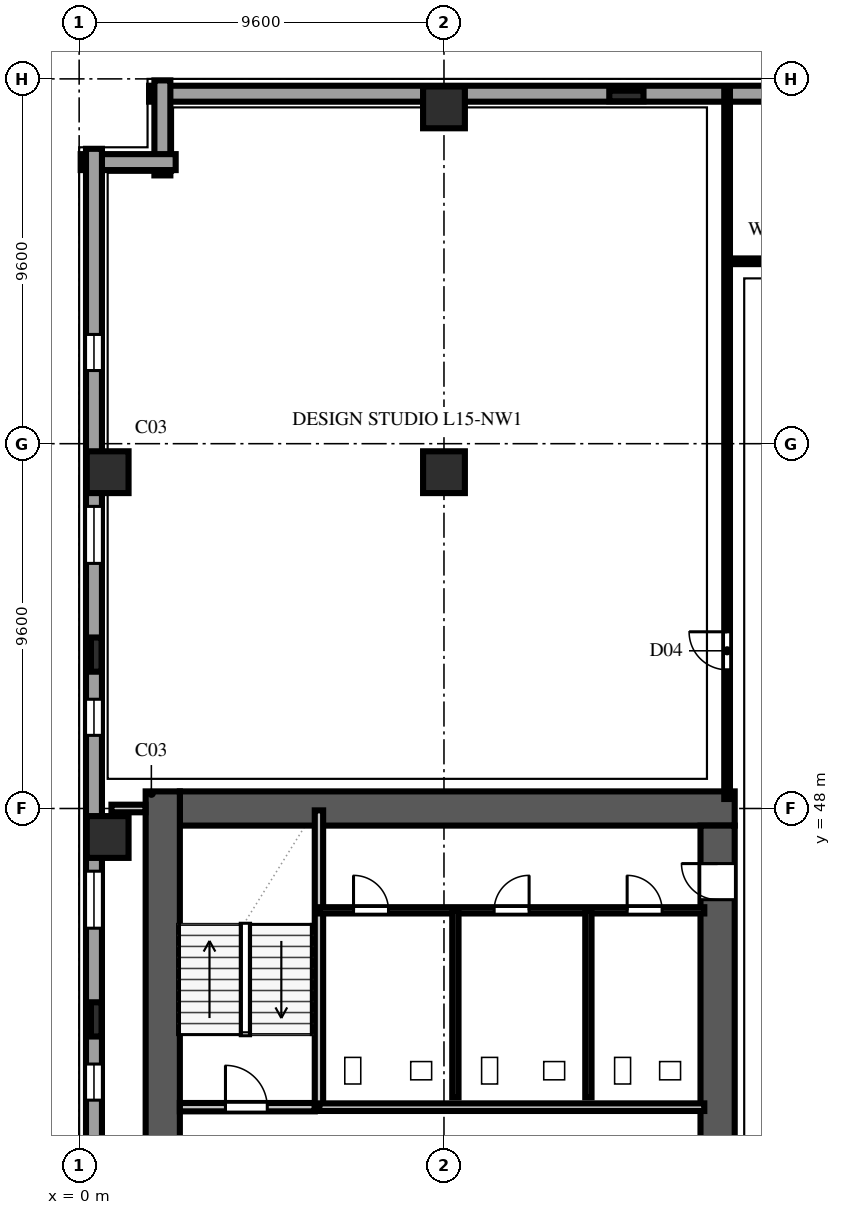
"""IFC4 building model, lengths in metres.
Left out: names, types, materials, properties, quantities, classifications, styles, units other than length and angle.
Written with IfcOpenShell. Run it as: python <this file> out.ifc"""

import sys

from ifc_helpers import new_model, si_unit, direction, frame, frame_2d, origin, origin_2d, place, context, subcontext, project, spatial, rectangle, extrude, element, fill, save


model = new_model("IFC4")
c1 = context("Model", 3, precision=1e-05, world=origin(), true_north=direction((0.0, 1.0)))
c2 = subcontext(c1, "Body", "Model", "MODEL_VIEW")
j1 = project(units=[si_unit("LENGTHUNIT", "METRE"), si_unit("PLANEANGLEUNIT", "RADIAN")], contexts=[c1])
p1 = place(None, origin())
s1 = spatial("IfcSite", under=j1, at=p1, CompositionType="ELEMENT")
p2 = place(p1, origin())
s2 = spatial("IfcBuilding", under=s1, at=p2, CompositionType="ELEMENT")
p3 = place(p2, frame((0.0, 0.0, 62.2)))
s3 = spatial("IfcBuildingStorey", under=s2, at=p3, CompositionType="ELEMENT", Elevation=62.2)
p4 = place(p3, frame((2.65, 48.0, 0.0), z_axis=(0.0, 0.0, 1.0), x_axis=(1.0, 0.0, 0.0)))
e1 = element("IfcWall", 1, at=p4, inside=s3, PredefinedType="SHEAR", context=c2, shape_type="SweptSolid", body=[
    extrude(rectangle(XDim=14.6, YDim=0.9, at=frame_2d((7.3, 0.0))), origin(), (0.0, 0.0, 1.0), 3.54),
])
p5 = place(p3, frame((2.2, 9.15, 0.0), z_axis=(0.0, 0.0, 1.0), x_axis=(0.0, 1.0, 0.0)))
e2 = element("IfcWall", 2, at=p5, inside=s3, PredefinedType="SHEAR", context=c2, shape_type="SweptSolid", body=[
    extrude(rectangle(XDim=39.3, YDim=0.9, at=frame_2d((19.65, 0.0))), origin(), (0.0, 0.0, 1.0), 3.54),
])
p6 = place(p3, frame((16.8, 36.4, 0.0), z_axis=(0.0, 0.0, 1.0), x_axis=(0.0, 1.0, 0.0)))
e3 = element("IfcWall", 3, at=p6, inside=s3, PredefinedType="SHEAR", context=c2, shape_type="SweptSolid", body=[
    extrude(rectangle(XDim=11.15, YDim=0.9, at=frame_2d((5.575, 0.0))), origin(), (0.0, 0.0, 1.0), 3.54),
])
p7 = place(p6, frame((9.2, 0.0, 0.0)))
e4 = element("IfcOpeningElement", 4, at=p7, cuts=e3, PredefinedType="OPENING", context=c2, shape_type="SweptSolid", body=[
    extrude(rectangle(XDim=0.95, YDim=2.15, at=frame_2d((0.475, 1.075))), frame((0.0, 0.462, 0.0), z_axis=(0.0, -1.0, 0.0), x_axis=(1.0, 0.0, 0.0)), (0.0, 0.0, 1.0), 0.924),
])
for number, where, z_axis, x_axis in (
    (5, (0.75, 47.25, 0.0), (0.0, 0.0, 1.0), (1.0, 0.0, 0.0)),
    (6, (0.75, 56.85, 0.0), (0.0, 0.0, 1.0), (1.0, 0.0, 0.0)),
    (7, (9.6, 56.85, 0.0), (0.0, 0.0, 1.0), (1.0, 0.0, 0.0)),
    (8, (9.6, 66.45, 0.0), (0.0, 0.0, 1.0), (1.0, 0.0, 0.0)),
):
    element("IfcColumn", number, at=place(p3, frame(where, z_axis=z_axis, x_axis=x_axis)), inside=s3, PredefinedType="COLUMN", context=c2, shape_type="SweptSolid", body=[
        extrude(rectangle(XDim=1.1, YDim=1.1, at=origin_2d()), origin(), (0.0, 0.0, 1.0), 3.8),
    ])
for number, where, z_axis, x_axis in (
    (9, (0.45, 42.45, 0.0), (0.0, 0.0, 1.0), (0.0, 1.0, 0.0)),
    (10, (0.45, 52.05, 0.0), (0.0, 0.0, 1.0), (0.0, 1.0, 0.0)),
    (11, (14.4, 66.75, 0.0), (0.0, 0.0, 1.0), (1.0, 0.0, 0.0)),
):
    element("IfcColumn", number, at=place(p3, frame(where, z_axis=z_axis, x_axis=x_axis)), inside=s3, PredefinedType="PILASTER", context=c2, shape_type="SweptSolid", body=[
        extrude(rectangle(XDim=0.9, YDim=0.28, at=origin_2d()), origin(), (0.0, 0.0, 1.0), 3.8),
    ])
p8 = place(p3, frame((36.56, 66.81, 0.0), z_axis=(0.0, 0.0, 1.0), x_axis=(-1.0, 0.0, 0.0)))
e12 = element("IfcWall", 12, at=p8, inside=s3, PredefinedType="SOLIDWALL", context=c2, shape_type="SweptSolid", body=[
    extrude(rectangle(XDim=34.72, YDim=0.42, at=frame_2d((17.36, 0.0))), origin(), (0.0, 0.0, 1.0), 3.54),
])
p9 = place(p8, frame((4.885, 0.0, 0.9)))
e13 = element("IfcOpeningElement", 13, at=p9, cuts=e12, PredefinedType="OPENING", context=c2, shape_type="SweptSolid", body=[
    extrude(rectangle(XDim=0.95, YDim=1.85, at=frame_2d((0.475, 0.925))), frame((0.0, 0.222, 0.0), z_axis=(0.0, -1.0, 0.0), x_axis=(1.0, 0.0, 0.0)), (0.0, 0.0, 1.0), 0.444),
])
p10 = place(p8, frame((9.41, 0.0, 0.9)))
e14 = element("IfcOpeningElement", 14, at=p10, cuts=e12, PredefinedType="OPENING", context=c2, shape_type="SweptSolid", body=[
    extrude(rectangle(XDim=1.5, YDim=1.85, at=frame_2d((0.75, 0.925))), frame((0.0, 0.222, 0.0), z_axis=(0.0, -1.0, 0.0), x_axis=(1.0, 0.0, 0.0)), (0.0, 0.0, 1.0), 0.444),
])
p11 = place(p8, frame((14.485, 0.0, 0.9)))
e15 = element("IfcOpeningElement", 15, at=p11, cuts=e12, PredefinedType="OPENING", context=c2, shape_type="SweptSolid", body=[
    extrude(rectangle(XDim=0.95, YDim=1.85, at=frame_2d((0.475, 0.925))), frame((0.0, 0.222, 0.0), z_axis=(0.0, -1.0, 0.0), x_axis=(1.0, 0.0, 0.0)), (0.0, 0.0, 1.0), 0.444),
])
for number, where, z_axis, x_axis in (
    (16, (2.19, 67.16, 0.0), (0.0, 0.0, 1.0), (0.0, -1.0, 0.0)),
    (17, (2.54, 65.01, 0.0), (0.0, 0.0, 1.0), (-1.0, 0.0, 0.0)),
):
    element("IfcWall", number, at=place(p3, frame(where, z_axis=z_axis, x_axis=x_axis)), inside=s3, PredefinedType="SOLIDWALL", context=c2, shape_type="SweptSolid", body=[
        extrude(rectangle(XDim=2.5, YDim=0.42, at=frame_2d((1.25, 0.0))), origin(), (0.0, 0.0, 1.0), 3.54),
    ])
p12 = place(p3, frame((0.39, 65.36, 0.0), z_axis=(0.0, 0.0, 1.0), x_axis=(0.0, -1.0, 0.0)))
e18 = element("IfcWall", 18, at=p12, inside=s3, PredefinedType="SOLIDWALL", context=c2, shape_type="SweptSolid", body=[
    extrude(rectangle(XDim=63.52, YDim=0.42, at=frame_2d((31.76, 0.0))), origin(), (0.0, 0.0, 1.0), 3.54),
])
p13 = place(p12, frame((4.885, 0.0, 0.9)))
e19 = element("IfcOpeningElement", 19, at=p13, cuts=e18, PredefinedType="OPENING", context=c2, shape_type="SweptSolid", body=[
    extrude(rectangle(XDim=0.95, YDim=1.85, at=frame_2d((0.475, 0.925))), frame((0.0, 0.222, 0.0), z_axis=(0.0, -1.0, 0.0), x_axis=(1.0, 0.0, 0.0)), (0.0, 0.0, 1.0), 0.444),
])
p14 = place(p12, frame((9.41, 0.0, 0.9)))
e20 = element("IfcOpeningElement", 20, at=p14, cuts=e18, PredefinedType="OPENING", context=c2, shape_type="SweptSolid", body=[
    extrude(rectangle(XDim=1.5, YDim=1.85, at=frame_2d((0.75, 0.925))), frame((0.0, 0.222, 0.0), z_axis=(0.0, -1.0, 0.0), x_axis=(1.0, 0.0, 0.0)), (0.0, 0.0, 1.0), 0.444),
])
p15 = place(p12, frame((14.485, 0.0, 0.9)))
e21 = element("IfcOpeningElement", 21, at=p15, cuts=e18, PredefinedType="OPENING", context=c2, shape_type="SweptSolid", body=[
    extrude(rectangle(XDim=0.95, YDim=1.85, at=frame_2d((0.475, 0.925))), frame((0.0, 0.222, 0.0), z_axis=(0.0, -1.0, 0.0), x_axis=(1.0, 0.0, 0.0)), (0.0, 0.0, 1.0), 0.444),
])
p16 = place(p12, frame((19.01, 0.0, 0.9)))
e22 = element("IfcOpeningElement", 22, at=p16, cuts=e18, PredefinedType="OPENING", context=c2, shape_type="SweptSolid", body=[
    extrude(rectangle(XDim=1.5, YDim=1.85, at=frame_2d((0.75, 0.925))), frame((0.0, 0.222, 0.0), z_axis=(0.0, -1.0, 0.0), x_axis=(1.0, 0.0, 0.0)), (0.0, 0.0, 1.0), 0.444),
])
p17 = place(p12, frame((24.085, 0.0, 0.9)))
e23 = element("IfcOpeningElement", 23, at=p17, cuts=e18, PredefinedType="OPENING", context=c2, shape_type="SweptSolid", body=[
    extrude(rectangle(XDim=0.95, YDim=1.85, at=frame_2d((0.475, 0.925))), frame((0.0, 0.222, 0.0), z_axis=(0.0, -1.0, 0.0), x_axis=(1.0, 0.0, 0.0)), (0.0, 0.0, 1.0), 0.444),
])
p18 = place(p12, frame((28.61, 0.0, 0.9)))
e24 = element("IfcOpeningElement", 24, at=p18, cuts=e18, PredefinedType="OPENING", context=c2, shape_type="SweptSolid", body=[
    extrude(rectangle(XDim=1.5, YDim=1.85, at=frame_2d((0.75, 0.925))), frame((0.0, 0.222, 0.0), z_axis=(0.0, -1.0, 0.0), x_axis=(1.0, 0.0, 0.0)), (0.0, 0.0, 1.0), 0.444),
])
p19 = place(p12, frame((33.685, 0.0, 0.9)))
e25 = element("IfcOpeningElement", 25, at=p19, cuts=e18, PredefinedType="OPENING", context=c2, shape_type="SweptSolid", body=[
    extrude(rectangle(XDim=0.95, YDim=1.85, at=frame_2d((0.475, 0.925))), frame((0.0, 0.222, 0.0), z_axis=(0.0, -1.0, 0.0), x_axis=(1.0, 0.0, 0.0)), (0.0, 0.0, 1.0), 0.444),
])
p20 = place(p12, frame((38.21, 0.0, 0.9)))
e26 = element("IfcOpeningElement", 26, at=p20, cuts=e18, PredefinedType="OPENING", context=c2, shape_type="SweptSolid", body=[
    extrude(rectangle(XDim=1.5, YDim=1.85, at=frame_2d((0.75, 0.925))), frame((0.0, 0.222, 0.0), z_axis=(0.0, -1.0, 0.0), x_axis=(1.0, 0.0, 0.0)), (0.0, 0.0, 1.0), 0.444),
])
p21 = place(p12, frame((43.285, 0.0, 0.9)))
e27 = element("IfcOpeningElement", 27, at=p21, cuts=e18, PredefinedType="OPENING", context=c2, shape_type="SweptSolid", body=[
    extrude(rectangle(XDim=0.95, YDim=1.85, at=frame_2d((0.475, 0.925))), frame((0.0, 0.222, 0.0), z_axis=(0.0, -1.0, 0.0), x_axis=(1.0, 0.0, 0.0)), (0.0, 0.0, 1.0), 0.444),
])
p22 = place(p12, frame((47.81, 0.0, 0.9)))
e28 = element("IfcOpeningElement", 28, at=p22, cuts=e18, PredefinedType="OPENING", context=c2, shape_type="SweptSolid", body=[
    extrude(rectangle(XDim=1.5, YDim=1.85, at=frame_2d((0.75, 0.925))), frame((0.0, 0.222, 0.0), z_axis=(0.0, -1.0, 0.0), x_axis=(1.0, 0.0, 0.0)), (0.0, 0.0, 1.0), 0.444),
])
p23 = place(p12, frame((52.885, 0.0, 0.9)))
e29 = element("IfcOpeningElement", 29, at=p23, cuts=e18, PredefinedType="OPENING", context=c2, shape_type="SweptSolid", body=[
    extrude(rectangle(XDim=0.95, YDim=1.85, at=frame_2d((0.475, 0.925))), frame((0.0, 0.222, 0.0), z_axis=(0.0, -1.0, 0.0), x_axis=(1.0, 0.0, 0.0)), (0.0, 0.0, 1.0), 0.444),
])
p24 = place(p3, frame((2.65, 40.14, 0.0), z_axis=(0.0, 0.0, 1.0), x_axis=(1.0, 0.0, 0.0)))
e30 = element("IfcWall", 30, at=p24, inside=s3, PredefinedType="SOLIDWALL", context=c2, shape_type="SweptSolid", body=[
    extrude(rectangle(XDim=3.55, YDim=0.22, at=frame_2d((1.775, 0.0))), origin(), (0.0, 0.0, 1.0), 3.54),
])
p25 = place(p24, frame((1.2, 0.0, 0.0)))
e31 = element("IfcOpeningElement", 31, at=p25, cuts=e30, PredefinedType="OPENING", context=c2, shape_type="SweptSolid", body=[
    extrude(rectangle(XDim=1.1, YDim=2.2, at=frame_2d((0.55, 1.1))), frame((0.0, 0.122, 0.0), z_axis=(0.0, -1.0, 0.0), x_axis=(1.0, 0.0, 0.0)), (0.0, 0.0, 1.0), 0.244),
])
p26 = place(p3, frame((6.31, 40.14, 0.0), z_axis=(0.0, 0.0, 1.0), x_axis=(0.0, 1.0, 0.0)))
e32 = element("IfcWall", 32, at=p26, inside=s3, PredefinedType="SOLIDWALL", context=c2, shape_type="SweptSolid", body=[
    extrude(rectangle(XDim=7.81, YDim=0.22, at=frame_2d((3.905, 0.0))), origin(), (0.0, 0.0, 1.0), 3.54),
])
p27 = place(p3, frame((6.32, 40.14, 0.0), z_axis=(0.0, 0.0, 1.0), x_axis=(1.0, 0.0, 0.0)))
e33 = element("IfcWall", 33, at=p27, inside=s3, PredefinedType="SOLIDWALL", context=c2, shape_type="SweptSolid", body=[
    extrude(rectangle(XDim=10.13, YDim=0.2, at=frame_2d((5.065, 0.0))), origin(), (0.0, 0.0, 1.0), 3.54),
])
p28 = place(p3, frame((6.32, 45.32, 0.0), z_axis=(0.0, 0.0, 1.0), x_axis=(1.0, 0.0, 0.0)))
e34 = element("IfcWall", 34, at=p28, inside=s3, PredefinedType="PLUMBINGWALL", context=c2, shape_type="SweptSolid", body=[
    extrude(rectangle(XDim=10.13, YDim=0.165, at=frame_2d((5.065, 0.0))), origin(), (0.0, 0.0, 1.0), 3.54),
])
p29 = place(p28, frame((0.9, 0.0, 0.0)))
e35 = element("IfcOpeningElement", 35, at=p29, cuts=e34, PredefinedType="OPENING", context=c2, shape_type="SweptSolid", body=[
    extrude(rectangle(XDim=0.92, YDim=2.15, at=frame_2d((0.46, 1.075))), frame((0.0, 0.094, 0.0), z_axis=(0.0, -1.0, 0.0), x_axis=(1.0, 0.0, 0.0)), (0.0, 0.0, 1.0), 0.189),
])
p30 = place(p28, frame((4.6, 0.0, 0.0)))
e36 = element("IfcOpeningElement", 36, at=p30, cuts=e34, PredefinedType="OPENING", context=c2, shape_type="SweptSolid", body=[
    extrude(rectangle(XDim=0.92, YDim=2.15, at=frame_2d((0.46, 1.075))), frame((0.0, 0.094, 0.0), z_axis=(0.0, -1.0, 0.0), x_axis=(1.0, 0.0, 0.0)), (0.0, 0.0, 1.0), 0.189),
])
p31 = place(p28, frame((8.1, 0.0, 0.0)))
e37 = element("IfcOpeningElement", 37, at=p31, cuts=e34, PredefinedType="OPENING", context=c2, shape_type="SweptSolid", body=[
    extrude(rectangle(XDim=0.92, YDim=2.15, at=frame_2d((0.46, 1.075))), frame((0.0, 0.094, 0.0), z_axis=(0.0, -1.0, 0.0), x_axis=(1.0, 0.0, 0.0)), (0.0, 0.0, 1.0), 0.189),
])
for number, where, z_axis, x_axis in (
    (38, (9.9, 40.4, 0.0), (0.0, 0.0, 1.0), (0.0, 1.0, 0.0)),
    (39, (13.4, 40.4, 0.0), (0.0, 0.0, 1.0), (0.0, 1.0, 0.0)),
):
    element("IfcWall", number, at=place(p3, frame(where, z_axis=z_axis, x_axis=x_axis)), inside=s3, PredefinedType="PLUMBINGWALL", context=c2, shape_type="SweptSolid", body=[
        extrude(rectangle(XDim=4.92, YDim=0.165, at=frame_2d((2.46, 0.0))), origin(), (0.0, 0.0, 1.0), 3.54),
    ])
p32 = place(p3, frame((0.85, 48.0, 0.0), z_axis=(0.0, 0.0, 1.0), x_axis=(1.0, 0.0, 0.0)))
e40 = element("IfcWall", 40, at=p32, inside=s3, PredefinedType="SOLIDWALL", context=c2, shape_type="SweptSolid", body=[
    extrude(rectangle(XDim=0.895, YDim=0.2, at=frame_2d((0.448, 0.0))), origin(), (0.0, 0.0, 1.0), 3.54),
])
p33 = place(p3, frame((17.05, 62.4, 0.0), z_axis=(0.0, 0.0, 1.0), x_axis=(1.0, 0.0, 0.0)))
e41 = element("IfcWall", 41, at=p33, inside=s3, PredefinedType="PARTITIONING", context=c2, shape_type="SweptSolid", body=[
    extrude(rectangle(XDim=2.15, YDim=0.15, at=frame_2d((1.075, 0.0))), origin(), (0.0, 0.0, 1.0), 3.54),
])
p34 = place(p3, frame((17.05, 48.25, 0.0), z_axis=(0.0, 0.0, 1.0), x_axis=(0.0, 1.0, 0.0)))
e42 = element("IfcWall", 42, at=p34, inside=s3, PredefinedType="PARTITIONING", context=c2, shape_type="SweptSolid", body=[
    extrude(rectangle(XDim=18.73, YDim=0.15, at=frame_2d((9.365, 0.0))), origin(), (0.0, 0.0, 1.0), 3.54),
])
p35 = place(p34, frame((3.4, 0.0, 0.0)))
e43 = element("IfcOpeningElement", 43, at=p35, cuts=e42, PredefinedType="OPENING", context=c2, shape_type="SweptSolid", body=[
    extrude(rectangle(XDim=1.0, YDim=2.2, at=frame_2d((0.5, 1.1))), frame((0.0, 0.087, 0.0), z_axis=(0.0, -1.0, 0.0), x_axis=(1.0, 0.0, 0.0)), (0.0, 0.0, 1.0), 0.174),
])
p36 = place(p13, origin())
e44 = element("IfcWindow", 44, at=p36, inside=s3, PartitioningType="SINGLE_PANEL", PredefinedType="WINDOW", context=c2, shape_type="SweptSolid", body=[
    extrude(rectangle(XDim=0.95, YDim=1.85, at=frame_2d((0.475, 0.925))), frame((0.0, 0.11, 0.0), z_axis=(0.0, -1.0, 0.0), x_axis=(1.0, 0.0, 0.0)), (0.0, 0.0, 1.0), 0.06),
])
fill(e19, e44)
p37 = place(p14, origin())
e45 = element("IfcWindow", 45, at=p37, inside=s3, PartitioningType="DOUBLE_PANEL_VERTICAL", PredefinedType="WINDOW", context=c2, shape_type="SweptSolid", body=[
    extrude(rectangle(XDim=1.5, YDim=1.85, at=frame_2d((0.75, 0.925))), frame((0.0, 0.11, 0.0), z_axis=(0.0, -1.0, 0.0), x_axis=(1.0, 0.0, 0.0)), (0.0, 0.0, 1.0), 0.06),
])
fill(e20, e45)
p38 = place(p15, origin())
e46 = element("IfcWindow", 46, at=p38, inside=s3, PartitioningType="SINGLE_PANEL", PredefinedType="WINDOW", context=c2, shape_type="SweptSolid", body=[
    extrude(rectangle(XDim=0.95, YDim=1.85, at=frame_2d((0.475, 0.925))), frame((0.0, 0.11, 0.0), z_axis=(0.0, -1.0, 0.0), x_axis=(1.0, 0.0, 0.0)), (0.0, 0.0, 1.0), 0.06),
])
fill(e21, e46)
p39 = place(p16, origin())
e47 = element("IfcWindow", 47, at=p39, inside=s3, PartitioningType="DOUBLE_PANEL_VERTICAL", PredefinedType="WINDOW", context=c2, shape_type="SweptSolid", body=[
    extrude(rectangle(XDim=1.5, YDim=1.85, at=frame_2d((0.75, 0.925))), frame((0.0, 0.11, 0.0), z_axis=(0.0, -1.0, 0.0), x_axis=(1.0, 0.0, 0.0)), (0.0, 0.0, 1.0), 0.06),
])
fill(e22, e47)
p40 = place(p17, origin())
e48 = element("IfcWindow", 48, at=p40, inside=s3, PartitioningType="SINGLE_PANEL", PredefinedType="WINDOW", context=c2, shape_type="SweptSolid", body=[
    extrude(rectangle(XDim=0.95, YDim=1.85, at=frame_2d((0.475, 0.925))), frame((0.0, 0.11, 0.0), z_axis=(0.0, -1.0, 0.0), x_axis=(1.0, 0.0, 0.0)), (0.0, 0.0, 1.0), 0.06),
])
fill(e23, e48)
p41 = place(p25, origin())
e49 = element("IfcDoor", 49, at=p41, inside=s3, OperationType="SINGLE_SWING_LEFT", PredefinedType="DOOR", context=c2, shape_type="SweptSolid", body=[
    extrude(rectangle(XDim=1.1, YDim=2.2, at=frame_2d((0.55, 1.1))), frame((0.0, 0.025, 0.0), z_axis=(0.0, -1.0, 0.0), x_axis=(1.0, 0.0, 0.0)), (0.0, 0.0, 1.0), 0.05),
])
fill(e31, e49)
p42 = place(p7, origin())
e50 = element("IfcDoor", 50, at=p42, inside=s3, OperationType="SINGLE_SWING_RIGHT", PredefinedType="DOOR", context=c2, shape_type="SweptSolid", body=[
    extrude(rectangle(XDim=0.95, YDim=2.15, at=frame_2d((0.475, 1.075))), frame((0.0, 0.025, 0.0), z_axis=(0.0, -1.0, 0.0), x_axis=(1.0, 0.0, 0.0)), (0.0, 0.0, 1.0), 0.05),
])
fill(e4, e50)
p43 = place(p29, origin())
e51 = element("IfcDoor", 51, at=p43, inside=s3, OperationType="SINGLE_SWING_LEFT", PredefinedType="DOOR", context=c2, shape_type="SweptSolid", body=[
    extrude(rectangle(XDim=0.92, YDim=2.15, at=frame_2d((0.46, 1.075))), frame((0.0, 0.025, 0.0), z_axis=(0.0, -1.0, 0.0), x_axis=(1.0, 0.0, 0.0)), (0.0, 0.0, 1.0), 0.05),
])
fill(e35, e51)
p44 = place(p30, origin())
e52 = element("IfcDoor", 52, at=p44, inside=s3, OperationType="SINGLE_SWING_RIGHT", PredefinedType="DOOR", context=c2, shape_type="SweptSolid", body=[
    extrude(rectangle(XDim=0.92, YDim=2.15, at=frame_2d((0.46, 1.075))), frame((0.0, 0.025, 0.0), z_axis=(0.0, -1.0, 0.0), x_axis=(1.0, 0.0, 0.0)), (0.0, 0.0, 1.0), 0.05),
])
fill(e36, e52)
p45 = place(p31, origin())
e53 = element("IfcDoor", 53, at=p45, inside=s3, OperationType="SINGLE_SWING_LEFT", PredefinedType="DOOR", context=c2, shape_type="SweptSolid", body=[
    extrude(rectangle(XDim=0.92, YDim=2.15, at=frame_2d((0.46, 1.075))), frame((0.0, 0.025, 0.0), z_axis=(0.0, -1.0, 0.0), x_axis=(1.0, 0.0, 0.0)), (0.0, 0.0, 1.0), 0.05),
])
fill(e37, e53)
p46 = place(p35, origin())
e54 = element("IfcDoor", 54, at=p46, inside=s3, OperationType="SINGLE_SWING_RIGHT", PredefinedType="DOOR", context=c2, shape_type="SweptSolid", body=[
    extrude(rectangle(XDim=1.0, YDim=2.2, at=frame_2d((0.5, 1.1))), frame((0.0, 0.025, 0.0), z_axis=(0.0, -1.0, 0.0), x_axis=(1.0, 0.0, 0.0)), (0.0, 0.0, 1.0), 0.05),
])
fill(e43, e54)
save(model, sys.argv[1])
